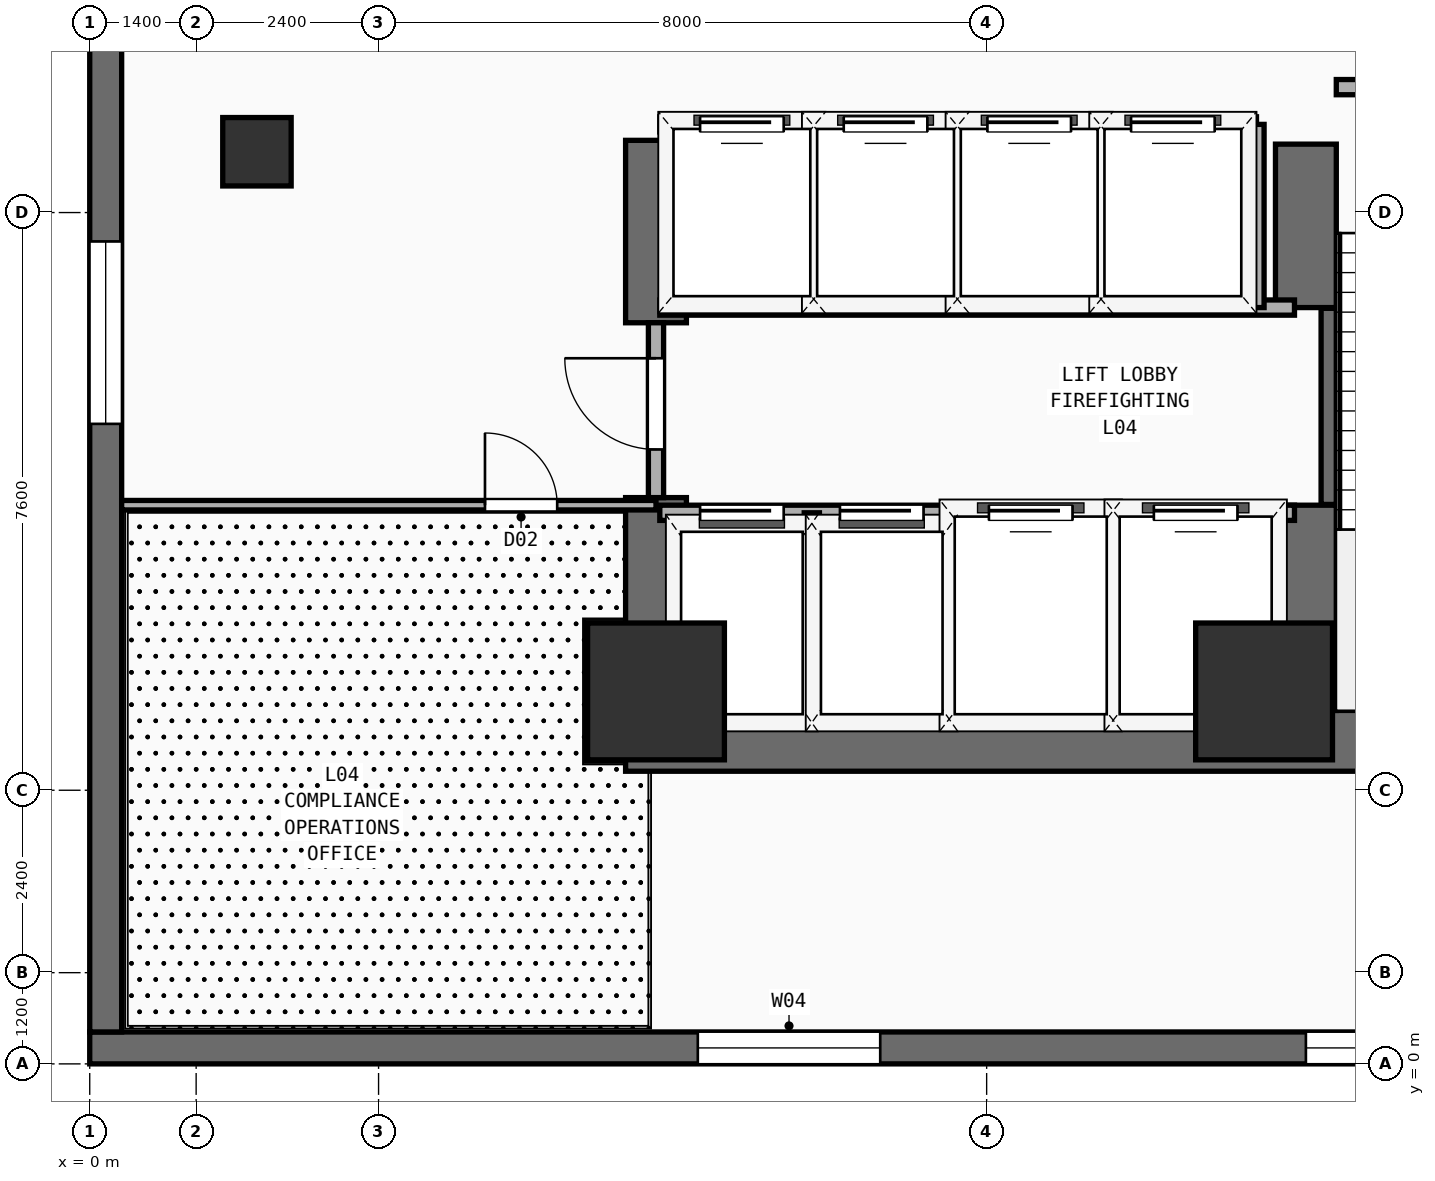
"""IFC4 building model, lengths in metres.
Left out: names, types, materials, properties, quantities, classifications, styles, units other than length and angle.
Written with IfcOpenShell. Run it as: python <this file> out.ifc"""

import sys

from ifc_helpers import new_model, si_unit, direction, frame, frame_2d, origin, origin_2d, place, context, subcontext, project, spatial, rectangle, extrude, element, fill, save


model = new_model("IFC4")
c1 = context("Model", 3, precision=1e-05, world=origin(), true_north=direction((0.0, 1.0)))
c2 = subcontext(c1, "Body", "Model", "MODEL_VIEW")
j1 = project(units=[si_unit("LENGTHUNIT", "METRE"), si_unit("PLANEANGLEUNIT", "RADIAN")], contexts=[c1])
p1 = place(None, origin())
s1 = spatial("IfcSite", under=j1, at=p1, CompositionType="ELEMENT")
p2 = place(p1, origin())
s2 = spatial("IfcBuilding", under=s1, at=p2, CompositionType="ELEMENT")
p3 = place(p2, frame((0.0, 0.0, 15.2)))
s3 = spatial("IfcBuildingStorey", under=s2, at=p3, CompositionType="ELEMENT", Elevation=15.2)
p4 = place(p3, frame((7.05, 4.25, 0.0), z_axis=(0.0, 0.0, 1.0), x_axis=(1.0, 0.0, 0.0)))
e1 = element("IfcWall", 1, at=p4, inside=s3, PredefinedType="SHEAR", context=c2, shape_type="SweptSolid", body=[
    extrude(rectangle(XDim=14.15, YDim=0.8, at=frame_2d((7.075, 0.0))), origin(), (0.0, 0.0, 1.0), 4.46),
])
p5 = place(p3, frame((7.45, 4.65, 0.0), z_axis=(0.0, 0.0, 1.0), x_axis=(0.0, 1.0, 0.0)))
e2 = element("IfcWall", 2, at=p5, inside=s3, PredefinedType="SHEAR", context=c2, shape_type="SweptSolid", body=[
    extrude(rectangle(XDim=2.8, YDim=0.8, at=frame_2d((1.4, 0.0))), origin(), (0.0, 0.0, 1.0), 4.46),
])
p6 = place(p3, frame((7.45, 9.75, 0.0), z_axis=(0.0, 0.0, 1.0), x_axis=(0.0, 1.0, 0.0)))
e3 = element("IfcWall", 3, at=p6, inside=s3, PredefinedType="SHEAR", context=c2, shape_type="SweptSolid", body=[
    extrude(rectangle(XDim=2.4, YDim=0.8, at=frame_2d((1.2, 0.0))), origin(), (0.0, 0.0, 1.0), 4.46),
])
p7 = place(p3, frame((16.0, 4.65, 0.0), z_axis=(0.0, 0.0, 1.0), x_axis=(0.0, 1.0, 0.0)))
e4 = element("IfcWall", 4, at=p7, inside=s3, PredefinedType="SHEAR", context=c2, shape_type="SweptSolid", body=[
    extrude(rectangle(XDim=2.7, YDim=0.8, at=frame_2d((1.35, 0.0))), origin(), (0.0, 0.0, 1.0), 4.46),
])
p8 = place(p3, frame((16.0, 9.95, 0.0), z_axis=(0.0, 0.0, 1.0), x_axis=(0.0, 1.0, 0.0)))
e5 = element("IfcWall", 5, at=p8, inside=s3, PredefinedType="SHEAR", context=c2, shape_type="SweptSolid", body=[
    extrude(rectangle(XDim=2.15, YDim=0.8, at=frame_2d((1.075, 0.0))), origin(), (0.0, 0.0, 1.0), 4.46),
])
for number, where, z_axis, x_axis in (
    (6, (7.45, 4.9, 0.0), (0.0, 0.0, 1.0), (1.0, 0.0, 0.0)),
    (7, (15.45, 4.9, 0.0), (0.0, 0.0, 1.0), (1.0, 0.0, 0.0)),
):
    element("IfcColumn", number, at=place(p3, frame(where, z_axis=z_axis, x_axis=x_axis)), inside=s3, PredefinedType="COLUMN", context=c2, shape_type="SweptSolid", body=[
        extrude(rectangle(XDim=1.8, YDim=1.8, at=origin_2d()), origin(), (0.0, 0.0, 1.0), 4.46),
    ])
p9 = place(p3, frame((2.2, 12.0, 0.0), z_axis=(0.0, 0.0, 1.0), x_axis=(1.0, 0.0, 0.0)))
e8 = element("IfcColumn", 8, at=p9, inside=s3, PredefinedType="PILASTER", context=c2, shape_type="SweptSolid", body=[
    extrude(rectangle(XDim=0.9, YDim=0.9, at=origin_2d()), origin(), (0.0, 0.0, 1.0), 4.46),
])
p10 = place(p3, frame((0.0, 0.21, 0.0), z_axis=(0.0, 0.0, 1.0), x_axis=(1.0, 0.0, 0.0)))
e9 = element("IfcWall", 9, at=p10, inside=s3, PredefinedType="SOLIDWALL", context=c2, shape_type="SweptSolid", body=[
    extrude(rectangle(XDim=64.8, YDim=0.42, at=frame_2d((32.4, 0.0))), origin(), (0.0, 0.0, 1.0), 4.46),
])
p11 = place(p10, frame((8.0, 0.0, 0.95)))
e10 = element("IfcOpeningElement", 10, at=p11, cuts=e9, PredefinedType="OPENING", context=c2, shape_type="SweptSolid", body=[
    extrude(rectangle(XDim=2.4, YDim=2.1, at=frame_2d((1.2, 1.05))), frame((0.0, 0.22, 0.0), z_axis=(0.0, -1.0, 0.0), x_axis=(1.0, 0.0, 0.0)), (0.0, 0.0, 1.0), 0.44),
])
p12 = place(p10, frame((16.0, 0.0, 0.95)))
e11 = element("IfcOpeningElement", 11, at=p12, cuts=e9, PredefinedType="OPENING", context=c2, shape_type="SweptSolid", body=[
    extrude(rectangle(XDim=2.4, YDim=2.1, at=frame_2d((1.2, 1.05))), frame((0.0, 0.22, 0.0), z_axis=(0.0, -1.0, 0.0), x_axis=(1.0, 0.0, 0.0)), (0.0, 0.0, 1.0), 0.44),
])
p13 = place(p10, frame((24.0, 0.0, 0.95)))
e12 = element("IfcOpeningElement", 12, at=p13, cuts=e9, PredefinedType="OPENING", context=c2, shape_type="SweptSolid", body=[
    extrude(rectangle(XDim=2.4, YDim=2.1, at=frame_2d((1.2, 1.05))), frame((0.0, 0.22, 0.0), z_axis=(0.0, -1.0, 0.0), x_axis=(1.0, 0.0, 0.0)), (0.0, 0.0, 1.0), 0.44),
])
p14 = place(p10, frame((34.0, 0.0, 0.95)))
e13 = element("IfcOpeningElement", 13, at=p14, cuts=e9, PredefinedType="OPENING", context=c2, shape_type="SweptSolid", body=[
    extrude(rectangle(XDim=2.4, YDim=2.1, at=frame_2d((1.2, 1.05))), frame((0.0, 0.22, 0.0), z_axis=(0.0, -1.0, 0.0), x_axis=(1.0, 0.0, 0.0)), (0.0, 0.0, 1.0), 0.44),
])
p15 = place(p10, frame((44.5, 0.0, 0.95)))
e14 = element("IfcOpeningElement", 14, at=p15, cuts=e9, PredefinedType="OPENING", context=c2, shape_type="SweptSolid", body=[
    extrude(rectangle(XDim=2.4, YDim=2.1, at=frame_2d((1.2, 1.05))), frame((0.0, 0.22, 0.0), z_axis=(0.0, -1.0, 0.0), x_axis=(1.0, 0.0, 0.0)), (0.0, 0.0, 1.0), 0.44),
])
p16 = place(p10, frame((58.0, 0.0, 0.95)))
e15 = element("IfcOpeningElement", 15, at=p16, cuts=e9, PredefinedType="OPENING", context=c2, shape_type="SweptSolid", body=[
    extrude(rectangle(XDim=2.4, YDim=2.1, at=frame_2d((1.2, 1.05))), frame((0.0, 0.22, 0.0), z_axis=(0.0, -1.0, 0.0), x_axis=(1.0, 0.0, 0.0)), (0.0, 0.0, 1.0), 0.44),
])
p17 = place(p3, frame((0.21, 0.42, 0.0), z_axis=(0.0, 0.0, 1.0), x_axis=(0.0, 1.0, 0.0)))
e16 = element("IfcWall", 16, at=p17, inside=s3, PredefinedType="SOLIDWALL", context=c2, shape_type="SweptSolid", body=[
    extrude(rectangle(XDim=50.78, YDim=0.42, at=frame_2d((25.39, 0.0))), origin(), (0.0, 0.0, 1.0), 4.46),
])
p18 = place(p17, frame((8.0, 0.0, 0.95)))
e17 = element("IfcOpeningElement", 17, at=p18, cuts=e16, PredefinedType="OPENING", context=c2, shape_type="SweptSolid", body=[
    extrude(rectangle(XDim=2.4, YDim=2.1, at=frame_2d((1.2, 1.05))), frame((0.0, 0.22, 0.0), z_axis=(0.0, -1.0, 0.0), x_axis=(1.0, 0.0, 0.0)), (0.0, 0.0, 1.0), 0.44),
])
p19 = place(p17, frame((18.0, 0.0, 0.95)))
e18 = element("IfcOpeningElement", 18, at=p19, cuts=e16, PredefinedType="OPENING", context=c2, shape_type="SweptSolid", body=[
    extrude(rectangle(XDim=2.4, YDim=2.1, at=frame_2d((1.2, 1.05))), frame((0.0, 0.22, 0.0), z_axis=(0.0, -1.0, 0.0), x_axis=(1.0, 0.0, 0.0)), (0.0, 0.0, 1.0), 0.44),
])
p20 = place(p17, frame((27.5, 0.0, 0.95)))
e19 = element("IfcOpeningElement", 19, at=p20, cuts=e16, PredefinedType="OPENING", context=c2, shape_type="SweptSolid", body=[
    extrude(rectangle(XDim=2.4, YDim=2.1, at=frame_2d((1.2, 1.05))), frame((0.0, 0.22, 0.0), z_axis=(0.0, -1.0, 0.0), x_axis=(1.0, 0.0, 0.0)), (0.0, 0.0, 1.0), 0.44),
])
p21 = place(p17, frame((45.0, 0.0, 0.95)))
e20 = element("IfcOpeningElement", 20, at=p21, cuts=e16, PredefinedType="OPENING", context=c2, shape_type="SweptSolid", body=[
    extrude(rectangle(XDim=2.4, YDim=2.1, at=frame_2d((1.2, 1.05))), frame((0.0, 0.22, 0.0), z_axis=(0.0, -1.0, 0.0), x_axis=(1.0, 0.0, 0.0)), (0.0, 0.0, 1.0), 0.44),
])
p22 = place(p3, frame((16.3, 7.36, 0.0), z_axis=(0.0, 0.0, 1.0), x_axis=(0.0, 1.0, 0.0)))
e21 = element("IfcWall", 21, at=p22, inside=s3, PredefinedType="SHEAR", context=c2, shape_type="SweptSolid", body=[
    extrude(rectangle(XDim=2.58, YDim=0.2, at=frame_2d((1.29, 0.0))), origin(), (0.0, 0.0, 1.0), 4.46),
])
p23 = place(p3, frame((16.4, 12.85, 0.0), z_axis=(0.0, 0.0, 1.0), x_axis=(1.0, 0.0, 0.0)))
e22 = element("IfcWall", 22, at=p23, inside=s3, PredefinedType="PARTITIONING", context=c2, shape_type="SweptSolid", body=[
    extrude(rectangle(XDim=3.96, YDim=0.2, at=frame_2d((1.98, 0.0))), origin(), (0.0, 0.0, 1.0), 4.46),
])
p24 = place(p23, frame((1.304, 0.0, 0.0)))
e23 = element("IfcOpeningElement", 23, at=p24, cuts=e22, PredefinedType="OPENING", context=c2, shape_type="SweptSolid", body=[
    extrude(rectangle(XDim=1.1, YDim=2.2, at=frame_2d((0.55, 1.1))), frame((0.0, 0.11, 0.0), z_axis=(0.0, -1.0, 0.0), x_axis=(1.0, 0.0, 0.0)), (0.0, 0.0, 1.0), 0.22),
])
p25 = place(p3, frame((7.5, 7.25, 0.0), z_axis=(0.0, 0.0, 1.0), x_axis=(1.0, 0.0, 0.0)))
e24 = element("IfcWall", 24, at=p25, inside=s3, PredefinedType="PARTITIONING", context=c2, shape_type="SweptSolid", body=[
    extrude(rectangle(XDim=8.35, YDim=0.2, at=frame_2d((4.175, 0.0))), origin(), (0.0, 0.0, 1.0), 4.46),
])
p26 = place(p25, frame((0.53, 0.0, 0.0)))
e25 = element("IfcOpeningElement", 25, at=p26, cuts=e24, PredefinedType="OPENING", context=c2, shape_type="SweptSolid", body=[
    extrude(rectangle(XDim=1.1, YDim=2.2, at=frame_2d((0.55, 1.1))), frame((0.0, 0.11, 0.0), z_axis=(0.0, -1.0, 0.0), x_axis=(1.0, 0.0, 0.0)), (0.0, 0.0, 1.0), 0.22),
])
p27 = place(p25, frame((2.37, 0.0, 0.0)))
e26 = element("IfcOpeningElement", 26, at=p27, cuts=e24, PredefinedType="OPENING", context=c2, shape_type="SweptSolid", body=[
    extrude(rectangle(XDim=1.1, YDim=2.2, at=frame_2d((0.55, 1.1))), frame((0.0, 0.11, 0.0), z_axis=(0.0, -1.0, 0.0), x_axis=(1.0, 0.0, 0.0)), (0.0, 0.0, 1.0), 0.22),
])
p28 = place(p25, frame((4.33, 0.0, 0.0)))
e27 = element("IfcOpeningElement", 27, at=p28, cuts=e24, PredefinedType="OPENING", context=c2, shape_type="SweptSolid", body=[
    extrude(rectangle(XDim=1.1, YDim=2.2, at=frame_2d((0.55, 1.1))), frame((0.0, 0.11, 0.0), z_axis=(0.0, -1.0, 0.0), x_axis=(1.0, 0.0, 0.0)), (0.0, 0.0, 1.0), 0.22),
])
p29 = place(p25, frame((6.5, 0.0, 0.0)))
e28 = element("IfcOpeningElement", 28, at=p29, cuts=e24, PredefinedType="OPENING", context=c2, shape_type="SweptSolid", body=[
    extrude(rectangle(XDim=1.1, YDim=2.2, at=frame_2d((0.55, 1.1))), frame((0.0, 0.11, 0.0), z_axis=(0.0, -1.0, 0.0), x_axis=(1.0, 0.0, 0.0)), (0.0, 0.0, 1.0), 0.22),
])
p30 = place(p3, frame((7.5, 9.95, 0.0), z_axis=(0.0, 0.0, 1.0), x_axis=(1.0, 0.0, 0.0)))
e29 = element("IfcWall", 29, at=p30, inside=s3, PredefinedType="PARTITIONING", context=c2, shape_type="SweptSolid", body=[
    extrude(rectangle(XDim=8.35, YDim=0.2, at=frame_2d((4.175, 0.0))), origin(), (0.0, 0.0, 1.0), 4.46),
])
for number, where, z_axis, x_axis in (
    (30, (9.5, 4.45, 0.0), (0.0, 0.0, 1.0), (0.0, 1.0, 0.0)),
    (31, (11.36, 4.45, 0.0), (0.0, 0.0, 1.0), (0.0, 1.0, 0.0)),
    (32, (13.46, 4.45, 0.0), (0.0, 0.0, 1.0), (0.0, 1.0, 0.0)),
):
    element("IfcWall", number, at=place(p3, frame(where, z_axis=z_axis, x_axis=x_axis)), inside=s3, PredefinedType="PARTITIONING", context=c2, shape_type="SweptSolid", body=[
        extrude(rectangle(XDim=2.8, YDim=0.2, at=frame_2d((1.4, 0.0))), origin(), (0.0, 0.0, 1.0), 4.46),
    ])
p31 = place(p3, frame((7.45, 7.45, 0.0), z_axis=(0.0, 0.0, 1.0), x_axis=(0.0, 1.0, 0.0)))
e33 = element("IfcWall", 33, at=p31, inside=s3, PredefinedType="PARTITIONING", context=c2, shape_type="SweptSolid", body=[
    extrude(rectangle(XDim=2.3, YDim=0.2, at=frame_2d((1.15, 0.0))), origin(), (0.0, 0.0, 1.0), 3.24),
])
p32 = place(p31, frame((0.633, 0.0, 0.0)))
e34 = element("IfcOpeningElement", 34, at=p32, cuts=e33, PredefinedType="OPENING", context=c2, shape_type="SweptSolid", body=[
    extrude(rectangle(XDim=1.2, YDim=2.25, at=frame_2d((0.6, 1.125))), frame((0.0, 0.11, 0.0), z_axis=(0.0, -1.0, 0.0), x_axis=(1.0, 0.0, 0.0)), (0.0, 0.0, 1.0), 0.22),
])
p33 = place(p3, frame((7.5, 12.36, 0.0), z_axis=(0.0, 0.0, 1.0), x_axis=(1.0, 0.0, 0.0)))
e35 = element("IfcWall", 35, at=p33, inside=s3, PredefinedType="PARTITIONING", context=c2, shape_type="SweptSolid", body=[
    extrude(rectangle(XDim=7.85, YDim=0.2, at=frame_2d((3.925, 0.0))), origin(), (0.0, 0.0, 1.0), 4.46),
])
p34 = place(p33, frame((0.53, 0.0, 0.0)))
e36 = element("IfcOpeningElement", 36, at=p34, cuts=e35, PredefinedType="OPENING", context=c2, shape_type="SweptSolid", body=[
    extrude(rectangle(XDim=1.1, YDim=2.2, at=frame_2d((0.55, 1.1))), frame((0.0, 0.11, 0.0), z_axis=(0.0, -1.0, 0.0), x_axis=(1.0, 0.0, 0.0)), (0.0, 0.0, 1.0), 0.22),
])
p35 = place(p33, frame((2.42, 0.0, 0.0)))
e37 = element("IfcOpeningElement", 37, at=p35, cuts=e35, PredefinedType="OPENING", context=c2, shape_type="SweptSolid", body=[
    extrude(rectangle(XDim=1.1, YDim=2.2, at=frame_2d((0.55, 1.1))), frame((0.0, 0.11, 0.0), z_axis=(0.0, -1.0, 0.0), x_axis=(1.0, 0.0, 0.0)), (0.0, 0.0, 1.0), 0.22),
])
p36 = place(p33, frame((4.31, 0.0, 0.0)))
e38 = element("IfcOpeningElement", 38, at=p36, cuts=e35, PredefinedType="OPENING", context=c2, shape_type="SweptSolid", body=[
    extrude(rectangle(XDim=1.1, YDim=2.2, at=frame_2d((0.55, 1.1))), frame((0.0, 0.11, 0.0), z_axis=(0.0, -1.0, 0.0), x_axis=(1.0, 0.0, 0.0)), (0.0, 0.0, 1.0), 0.22),
])
p37 = place(p33, frame((6.2, 0.0, 0.0)))
e39 = element("IfcOpeningElement", 39, at=p37, cuts=e35, PredefinedType="OPENING", context=c2, shape_type="SweptSolid", body=[
    extrude(rectangle(XDim=1.1, YDim=2.2, at=frame_2d((0.55, 1.1))), frame((0.0, 0.11, 0.0), z_axis=(0.0, -1.0, 0.0), x_axis=(1.0, 0.0, 0.0)), (0.0, 0.0, 1.0), 0.22),
])
for number, where, z_axis, x_axis in (
    (40, (15.35, 9.95, 0.0), (0.0, 0.0, 1.0), (0.0, 1.0, 0.0)),
    (41, (9.52, 9.95, 0.0), (0.0, 0.0, 1.0), (0.0, 1.0, 0.0)),
    (42, (11.41, 9.95, 0.0), (0.0, 0.0, 1.0), (0.0, 1.0, 0.0)),
    (43, (13.3, 9.95, 0.0), (0.0, 0.0, 1.0), (0.0, 1.0, 0.0)),
):
    element("IfcWall", number, at=place(p3, frame(where, z_axis=z_axis, x_axis=x_axis)), inside=s3, PredefinedType="PARTITIONING", context=c2, shape_type="SweptSolid", body=[
        extrude(rectangle(XDim=2.41, YDim=0.2, at=frame_2d((1.205, 0.0))), origin(), (0.0, 0.0, 1.0), 4.46),
    ])
p38 = place(p3, frame((0.42, 7.35, 0.0), z_axis=(0.0, 0.0, 1.0), x_axis=(1.0, 0.0, 0.0)))
e44 = element("IfcWall", 44, at=p38, inside=s3, PredefinedType="PARTITIONING", context=c2, shape_type="SweptSolid", body=[
    extrude(rectangle(XDim=7.03, YDim=0.125, at=frame_2d((3.515, 0.0))), origin(), (0.0, 0.0, 1.0), 4.46),
])
p39 = place(p38, frame((4.78, 0.0, 0.0)))
e45 = element("IfcOpeningElement", 45, at=p39, cuts=e44, PredefinedType="OPENING", context=c2, shape_type="SweptSolid", body=[
    extrude(rectangle(XDim=0.95, YDim=2.15, at=frame_2d((0.475, 1.075))), frame((0.0, 0.073, 0.0), z_axis=(0.0, -1.0, 0.0), x_axis=(1.0, 0.0, 0.0)), (0.0, 0.0, 1.0), 0.145),
])
p40 = place(p11, origin())
e46 = element("IfcWindow", 46, at=p40, inside=s3, PartitioningType="SINGLE_PANEL", PredefinedType="WINDOW", context=c2, shape_type="SweptSolid", body=[
    extrude(rectangle(XDim=2.4, YDim=2.1, at=frame_2d((1.2, 1.05))), frame((0.0, 0.03, 0.0), z_axis=(0.0, -1.0, 0.0), x_axis=(1.0, 0.0, 0.0)), (0.0, 0.0, 1.0), 0.06),
])
fill(e10, e46)
p41 = place(p12, origin())
e47 = element("IfcWindow", 47, at=p41, inside=s3, PartitioningType="SINGLE_PANEL", PredefinedType="WINDOW", context=c2, shape_type="SweptSolid", body=[
    extrude(rectangle(XDim=2.4, YDim=2.1, at=frame_2d((1.2, 1.05))), frame((0.0, 0.03, 0.0), z_axis=(0.0, -1.0, 0.0), x_axis=(1.0, 0.0, 0.0)), (0.0, 0.0, 1.0), 0.06),
])
fill(e11, e47)
p42 = place(p18, origin())
e48 = element("IfcWindow", 48, at=p42, inside=s3, PartitioningType="SINGLE_PANEL", PredefinedType="WINDOW", context=c2, shape_type="SweptSolid", body=[
    extrude(rectangle(XDim=2.4, YDim=2.1, at=frame_2d((1.2, 1.05))), frame((0.0, 0.03, 0.0), z_axis=(0.0, -1.0, 0.0), x_axis=(1.0, 0.0, 0.0)), (0.0, 0.0, 1.0), 0.06),
])
fill(e17, e48)
p43 = place(p26, origin())
e49 = element("IfcDoor", 49, at=p43, inside=s3, OperationType="SLIDING_TO_LEFT", PredefinedType="DOOR", context=c2, shape_type="SweptSolid", body=[
    extrude(rectangle(XDim=1.1, YDim=2.2, at=frame_2d((0.55, 1.1))), frame((0.0, 0.025, 0.0), z_axis=(0.0, -1.0, 0.0), x_axis=(1.0, 0.0, 0.0)), (0.0, 0.0, 1.0), 0.05),
])
fill(e25, e49)
p44 = place(p27, origin())
e50 = element("IfcDoor", 50, at=p44, inside=s3, OperationType="SLIDING_TO_LEFT", PredefinedType="DOOR", context=c2, shape_type="SweptSolid", body=[
    extrude(rectangle(XDim=1.1, YDim=2.2, at=frame_2d((0.55, 1.1))), frame((0.0, 0.025, 0.0), z_axis=(0.0, -1.0, 0.0), x_axis=(1.0, 0.0, 0.0)), (0.0, 0.0, 1.0), 0.05),
])
fill(e26, e50)
p45 = place(p28, origin())
e51 = element("IfcDoor", 51, at=p45, inside=s3, OperationType="SLIDING_TO_LEFT", PredefinedType="DOOR", context=c2, shape_type="SweptSolid", body=[
    extrude(rectangle(XDim=1.1, YDim=2.2, at=frame_2d((0.55, 1.1))), frame((0.0, 0.025, 0.0), z_axis=(0.0, -1.0, 0.0), x_axis=(1.0, 0.0, 0.0)), (0.0, 0.0, 1.0), 0.05),
])
fill(e27, e51)
p46 = place(p29, origin())
e52 = element("IfcDoor", 52, at=p46, inside=s3, OperationType="SLIDING_TO_LEFT", PredefinedType="DOOR", context=c2, shape_type="SweptSolid", body=[
    extrude(rectangle(XDim=1.1, YDim=2.2, at=frame_2d((0.55, 1.1))), frame((0.0, 0.025, 0.0), z_axis=(0.0, -1.0, 0.0), x_axis=(1.0, 0.0, 0.0)), (0.0, 0.0, 1.0), 0.05),
])
fill(e28, e52)
p47 = place(p32, frame((1.2, 0.0, 0.0), z_axis=(0.0, 0.0, 1.0), x_axis=(-1.0, 0.0, 0.0)))
e53 = element("IfcDoor", 53, at=p47, inside=s3, OperationType="SINGLE_SWING_LEFT", PredefinedType="DOOR", context=c2, shape_type="SweptSolid", body=[
    extrude(rectangle(XDim=1.2, YDim=2.25, at=frame_2d((0.6, 1.125))), frame((0.0, 0.025, 0.0), z_axis=(0.0, -1.0, 0.0), x_axis=(1.0, 0.0, 0.0)), (0.0, 0.0, 1.0), 0.05),
])
fill(e34, e53)
p48 = place(p34, origin())
e54 = element("IfcDoor", 54, at=p48, inside=s3, OperationType="SLIDING_TO_LEFT", PredefinedType="DOOR", context=c2, shape_type="SweptSolid", body=[
    extrude(rectangle(XDim=1.1, YDim=2.2, at=frame_2d((0.55, 1.1))), frame((0.0, 0.025, 0.0), z_axis=(0.0, -1.0, 0.0), x_axis=(1.0, 0.0, 0.0)), (0.0, 0.0, 1.0), 0.05),
])
fill(e36, e54)
p49 = place(p35, origin())
e55 = element("IfcDoor", 55, at=p49, inside=s3, OperationType="SLIDING_TO_LEFT", PredefinedType="DOOR", context=c2, shape_type="SweptSolid", body=[
    extrude(rectangle(XDim=1.1, YDim=2.2, at=frame_2d((0.55, 1.1))), frame((0.0, 0.025, 0.0), z_axis=(0.0, -1.0, 0.0), x_axis=(1.0, 0.0, 0.0)), (0.0, 0.0, 1.0), 0.05),
])
fill(e37, e55)
p50 = place(p36, origin())
e56 = element("IfcDoor", 56, at=p50, inside=s3, OperationType="SLIDING_TO_LEFT", PredefinedType="DOOR", context=c2, shape_type="SweptSolid", body=[
    extrude(rectangle(XDim=1.1, YDim=2.2, at=frame_2d((0.55, 1.1))), frame((0.0, 0.025, 0.0), z_axis=(0.0, -1.0, 0.0), x_axis=(1.0, 0.0, 0.0)), (0.0, 0.0, 1.0), 0.05),
])
fill(e38, e56)
p51 = place(p37, origin())
e57 = element("IfcDoor", 57, at=p51, inside=s3, OperationType="SLIDING_TO_LEFT", PredefinedType="DOOR", context=c2, shape_type="SweptSolid", body=[
    extrude(rectangle(XDim=1.1, YDim=2.2, at=frame_2d((0.55, 1.1))), frame((0.0, 0.025, 0.0), z_axis=(0.0, -1.0, 0.0), x_axis=(1.0, 0.0, 0.0)), (0.0, 0.0, 1.0), 0.05),
])
fill(e39, e57)
p52 = place(p39, origin())
e58 = element("IfcDoor", 58, at=p52, inside=s3, OperationType="SINGLE_SWING_LEFT", PredefinedType="DOOR", context=c2, shape_type="SweptSolid", body=[
    extrude(rectangle(XDim=0.95, YDim=2.15, at=frame_2d((0.475, 1.075))), frame((0.0, 0.025, 0.0), z_axis=(0.0, -1.0, 0.0), x_axis=(1.0, 0.0, 0.0)), (0.0, 0.0, 1.0), 0.05),
])
fill(e45, e58)
save(model, sys.argv[1])
